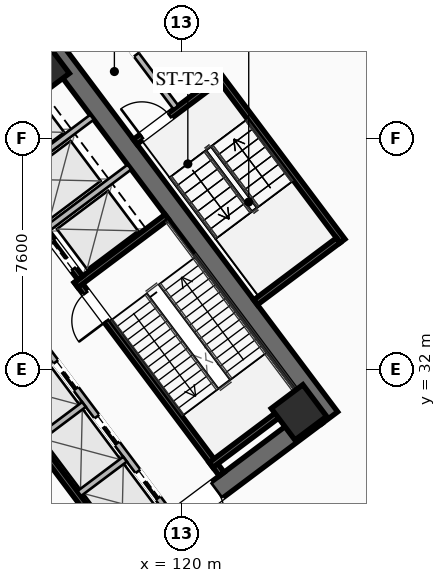
"""IFC4 building model, lengths in metres.
Left out: names, types, materials, properties, quantities, classifications, styles, units other than length and angle.
Written with IfcOpenShell. Run it as: python <this file> out.ifc"""

import sys

from ifc_helpers import new_model, si_unit, direction, frame, frame_2d, origin, origin_2d, place, context, subcontext, project, spatial, rectangle, hollow_rectangle, extrude, element, fill, save


model = new_model("IFC4")
c1 = context("Model", 3, precision=1e-05, world=origin(), true_north=direction((0.0, 1.0)))
c2 = subcontext(c1, "Body", "Model", "MODEL_VIEW")
j1 = project(units=[si_unit("LENGTHUNIT", "METRE"), si_unit("PLANEANGLEUNIT", "RADIAN")], contexts=[c1])
p1 = place(None, origin())
s1 = spatial("IfcSite", under=j1, at=p1, CompositionType="ELEMENT")
p2 = place(p1, origin())
s2 = spatial("IfcBuilding", under=s1, at=p2, CompositionType="ELEMENT")
p3 = place(p2, origin())
s3 = spatial("IfcBuildingStorey", under=s2, at=p3, CompositionType="ELEMENT", Elevation=0.0)
p4 = place(p3, frame((115.524, 42.893, 0.0), z_axis=(0.0, 0.0, 1.0), x_axis=(0.600005007985, -0.799996243986, 0.0)))
e1 = element("IfcWall", 1, at=p4, inside=s3, PredefinedType="SHEAR", context=c2, shape_type="SweptSolid", body=[
    extrude(rectangle(XDim=15.6, YDim=0.65, at=frame_2d((7.8, 0.0))), origin(), (0.0, 0.0, 1.0), 5.4),
])
p5 = place(p3, frame((124.429, 30.478, 0.0), z_axis=(0.0, 0.0, 1.0), x_axis=(-0.799998028465, -0.600002628705, 0.0)))
e2 = element("IfcWall", 2, at=p5, inside=s3, PredefinedType="SHEAR", context=c2, shape_type="SweptSolid", body=[
    extrude(rectangle(XDim=14.86, YDim=0.65, at=frame_2d((7.43, 0.0))), origin(), (0.0, 0.0, 1.0), 5.4),
])
p6 = place(p5, frame((9.13, 0.0, 0.0)))
e3 = element("IfcOpeningElement", 3, at=p6, cuts=e2, PredefinedType="OPENING", context=c2, shape_type="SweptSolid", body=[
    extrude(rectangle(XDim=1.25, YDim=2.25, at=frame_2d((0.625, 1.125))), frame((0.0, 0.335, 0.0), z_axis=(0.0, -1.0, 0.0), x_axis=(1.0, 0.0, 0.0)), (0.0, 0.0, 1.0), 0.67),
])
p7 = place(p5, frame((4.08, 0.0, 0.0)))
e4 = element("IfcOpeningElement", 4, at=p7, cuts=e2, PredefinedType="OPENING", context=c2, shape_type="SweptSolid", body=[
    extrude(rectangle(XDim=1.25, YDim=2.25, at=frame_2d((0.625, 1.125))), frame((0.0, 0.335, 0.0), z_axis=(0.0, -1.0, 0.0), x_axis=(1.0, 0.0, 0.0)), (0.0, 0.0, 1.0), 0.67),
])
for number, where, z_axis, x_axis in (
    (5, (123.87, 30.59, 0.0), (0.0, 0.0, 1.0), (0.8, 0.6, 0.0)),
    (6, (115.41, 41.87, 0.0), (0.0, 0.0, 1.0), (0.8, 0.6, 0.0)),
):
    element("IfcColumn", number, at=place(p3, frame(where, z_axis=z_axis, x_axis=x_axis)), inside=s3, PredefinedType="COLUMN", context=c2, shape_type="SweptSolid", body=[
        extrude(hollow_rectangle(XDim=1.3, YDim=1.3, WallThickness=0.05, at=origin_2d()), origin(), (0.0, 0.0, 1.0), 5.14),
    ])
p8 = place(p3, frame((121.33, 28.56, 0.0), z_axis=(0.0, 0.0, 1.0), x_axis=(-0.600009827119, 0.799992629566, 0.0)))
e7 = element("IfcWall", 7, at=p8, inside=s3, PredefinedType="SHEAR", context=c2, shape_type="SweptSolid", body=[
    extrude(rectangle(XDim=7.95, YDim=0.2, at=frame_2d((3.975, 0.0))), origin(), (0.0, 0.0, 1.0), 5.14),
])
p9 = place(p8, frame((6.3, 0.0, 0.0)))
e8 = element("IfcOpeningElement", 8, at=p9, cuts=e7, PredefinedType="OPENING", context=c2, shape_type="SweptSolid", body=[
    extrude(rectangle(XDim=1.15, YDim=2.2, at=frame_2d((0.575, 1.1))), frame((0.0, 0.11, 0.0), z_axis=(0.0, -1.0, 0.0), x_axis=(1.0, 0.0, 0.0)), (0.0, 0.0, 1.0), 0.22),
])
for number, where, z_axis, x_axis in (
    (9, (116.54, 34.78, 0.0), (0.0, 0.0, 1.0), (0.8, 0.6, 0.0)),
    (10, (120.98, 28.86, 0.0), (0.0, 0.0, 1.0), (0.8, 0.6, 0.0)),
):
    element("IfcWall", number, at=place(p3, frame(where, z_axis=z_axis, x_axis=x_axis)), inside=s3, PredefinedType="SHEAR", context=c2, shape_type="SweptSolid", body=[
        extrude(rectangle(XDim=3.73, YDim=0.2, at=frame_2d((1.865, 0.0))), origin(), (0.0, 0.0, 1.0), 5.14),
    ])
p10 = place(p3, frame((117.938, 26.016, 0.0), z_axis=(0.0, 0.0, 1.0), x_axis=(-0.600005463273, 0.799995902516, 0.0)))
e11 = element("IfcWall", 11, at=p10, inside=s3, PredefinedType="SHEAR", context=c2, shape_type="SweptSolid", body=[
    extrude(rectangle(XDim=14.3, YDim=0.2, at=frame_2d((7.15, 0.0))), origin(), (0.0, 0.0, 1.0), 5.14),
])
p11 = place(p3, frame((112.87, 40.09, 0.0), z_axis=(0.0, 0.0, 1.0), x_axis=(0.599975393228, -0.800018454488, 0.0)))
e12 = element("IfcWall", 12, at=p11, inside=s3, PredefinedType="SHEAR", context=c2, shape_type="SweptSolid", body=[
    extrude(rectangle(XDim=6.35, YDim=0.2, at=frame_2d((3.175, 0.0))), origin(), (0.0, 0.0, 1.0), 5.14),
])
p12 = place(p11, frame((4.875, 0.0, 0.0)))
e13 = element("IfcOpeningElement", 13, at=p12, cuts=e12, PredefinedType="OPENING", context=c2, shape_type="SweptSolid", body=[
    extrude(rectangle(XDim=1.1, YDim=2.2, at=frame_2d((0.55, 1.1))), frame((0.0, 0.11, 0.0), z_axis=(0.0, -1.0, 0.0), x_axis=(1.0, 0.0, 0.0)), (0.0, 0.0, 1.0), 0.22),
])
p13 = place(p11, frame((2.825, 0.0, 0.0)))
e14 = element("IfcOpeningElement", 14, at=p13, cuts=e12, PredefinedType="OPENING", context=c2, shape_type="SweptSolid", body=[
    extrude(rectangle(XDim=1.1, YDim=2.2, at=frame_2d((0.55, 1.1))), frame((0.0, 0.11, 0.0), z_axis=(0.0, -1.0, 0.0), x_axis=(1.0, 0.0, 0.0)), (0.0, 0.0, 1.0), 0.22),
])
p14 = place(p11, frame((0.825, 0.0, 0.0)))
e15 = element("IfcOpeningElement", 15, at=p14, cuts=e12, PredefinedType="OPENING", context=c2, shape_type="SweptSolid", body=[
    extrude(rectangle(XDim=1.1, YDim=2.2, at=frame_2d((0.55, 1.1))), frame((0.0, 0.11, 0.0), z_axis=(0.0, -1.0, 0.0), x_axis=(1.0, 0.0, 0.0)), (0.0, 0.0, 1.0), 0.22),
])
for number, where, z_axis, x_axis in (
    (16, (115.59, 36.63, 0.0), (0.0, 0.0, 1.0), (0.8, 0.6, 0.0)),
    (17, (114.36, 38.27, 0.0), (0.0, 0.0, 1.0), (0.8, 0.6, 0.0)),
):
    element("IfcWall", number, at=place(p3, frame(where, z_axis=z_axis, x_axis=x_axis)), inside=s3, PredefinedType="SOLIDWALL", context=c2, shape_type="SweptSolid", body=[
        extrude(rectangle(XDim=3.38, YDim=0.2, at=frame_2d((1.69, 0.0))), origin(), (0.0, 0.0, 1.0), 5.14),
    ])
p15 = place(p3, frame((119.61, 27.27, 0.0), z_axis=(0.0, 0.0, 1.0), x_axis=(-0.600011488909, 0.79999138319, 0.0)))
e18 = element("IfcWall", 18, at=p15, inside=s3, PredefinedType="SOLIDWALL", context=c2, shape_type="SweptSolid", body=[
    extrude(rectangle(XDim=6.8, YDim=0.2, at=frame_2d((3.4, 0.0))), origin(), (0.0, 0.0, 1.0), 5.14),
])
p16 = place(p15, frame((0.625, 0.0, 0.0)))
e19 = element("IfcOpeningElement", 19, at=p16, cuts=e18, PredefinedType="OPENING", context=c2, shape_type="SweptSolid", body=[
    extrude(rectangle(XDim=1.1, YDim=2.2, at=frame_2d((0.55, 1.1))), frame((0.0, 0.11, 0.0), z_axis=(0.0, -1.0, 0.0), x_axis=(1.0, 0.0, 0.0)), (0.0, 0.0, 1.0), 0.22),
])
p17 = place(p15, frame((2.875, 0.0, 0.0)))
e20 = element("IfcOpeningElement", 20, at=p17, cuts=e18, PredefinedType="OPENING", context=c2, shape_type="SweptSolid", body=[
    extrude(rectangle(XDim=1.1, YDim=2.2, at=frame_2d((0.55, 1.1))), frame((0.0, 0.11, 0.0), z_axis=(0.0, -1.0, 0.0), x_axis=(1.0, 0.0, 0.0)), (0.0, 0.0, 1.0), 0.22),
])
p18 = place(p15, frame((5.125, 0.0, 0.0)))
e21 = element("IfcOpeningElement", 21, at=p18, cuts=e18, PredefinedType="OPENING", context=c2, shape_type="SweptSolid", body=[
    extrude(rectangle(XDim=1.1, YDim=2.2, at=frame_2d((0.55, 1.1))), frame((0.0, 0.11, 0.0), z_axis=(0.0, -1.0, 0.0), x_axis=(1.0, 0.0, 0.0)), (0.0, 0.0, 1.0), 0.22),
])
p19 = place(p3, frame((116.646, 27.922, 0.0), z_axis=(0.0, 0.0, 1.0), x_axis=(0.8, 0.6, 0.0)))
e22 = element("IfcWall", 22, at=p19, inside=s3, PredefinedType="SOLIDWALL", context=c2, shape_type="SweptSolid", body=[
    extrude(rectangle(XDim=1.88, YDim=0.2, at=frame_2d((0.94, 0.0))), origin(), (0.0, 0.0, 1.0), 5.14),
])
p20 = place(p3, frame((115.296, 29.722, 0.0), z_axis=(0.0, 0.0, 1.0), x_axis=(0.799984418148, 0.600020775241, 0.0)))
e23 = element("IfcWall", 23, at=p20, inside=s3, PredefinedType="SOLIDWALL", context=c2, shape_type="SweptSolid", body=[
    extrude(rectangle(XDim=1.88, YDim=0.2, at=frame_2d((0.94, 0.0))), origin(), (0.0, 0.0, 1.0), 5.14),
])
p21 = place(p3, frame((125.304, 36.228, 0.0), z_axis=(0.0, 0.0, 1.0), x_axis=(-0.59998851072, 0.800008616831, 0.0)))
e24 = element("IfcWall", 24, at=p21, inside=s3, PredefinedType="SHEAR", context=c2, shape_type="SweptSolid", body=[
    extrude(rectangle(XDim=6.8, YDim=0.2, at=frame_2d((3.4, 0.0))), origin(), (0.0, 0.0, 1.0), 5.14),
])
p22 = place(p3, frame((118.484, 39.488, 0.0), z_axis=(0.0, 0.0, 1.0), x_axis=(0.800017232136, 0.599977023131, 0.0)))
e25 = element("IfcWall", 25, at=p22, inside=s3, PredefinedType="SHEAR", context=c2, shape_type="SweptSolid", body=[
    extrude(rectangle(XDim=3.4, YDim=0.2, at=frame_2d((1.7, 0.0))), origin(), (0.0, 0.0, 1.0), 5.14),
])
p23 = place(p22, frame((0.275, 0.0, 0.0)))
e26 = element("IfcOpeningElement", 26, at=p23, cuts=e25, PredefinedType="OPENING", context=c2, shape_type="SweptSolid", body=[
    extrude(rectangle(XDim=1.15, YDim=2.2, at=frame_2d((0.575, 1.1))), frame((0.0, 0.11, 0.0), z_axis=(0.0, -1.0, 0.0), x_axis=(1.0, 0.0, 0.0)), (0.0, 0.0, 1.0), 0.22),
])
p24 = place(p3, frame((122.444, 34.208, 0.0), z_axis=(0.0, 0.0, 1.0), x_axis=(0.79999138319, 0.600011488909, 0.0)))
e27 = element("IfcWall", 27, at=p24, inside=s3, PredefinedType="SHEAR", context=c2, shape_type="SweptSolid", body=[
    extrude(rectangle(XDim=3.4, YDim=0.2, at=frame_2d((1.7, 0.0))), origin(), (0.0, 0.0, 1.0), 5.14),
])
p25 = place(p3, frame((117.112, 44.234, 0.0), z_axis=(0.0, 0.0, 1.0), x_axis=(0.59999135767, -0.800006481675, 0.0)))
e28 = element("IfcWall", 28, at=p25, inside=s3, PredefinedType="SOLIDWALL", context=c2, shape_type="SweptSolid", body=[
    extrude(rectangle(XDim=4.52, YDim=0.2, at=frame_2d((2.26, 0.0))), origin(), (0.0, 0.0, 1.0), 3.31),
])
p26 = place(p25, frame((1.2, 0.0, 0.0)))
e29 = element("IfcOpeningElement", 29, at=p26, cuts=e28, PredefinedType="OPENING", context=c2, shape_type="SweptSolid", body=[
    extrude(rectangle(XDim=1.15, YDim=2.2, at=frame_2d((0.575, 1.1))), frame((0.0, 0.11, 0.0), z_axis=(0.0, -1.0, 0.0), x_axis=(1.0, 0.0, 0.0)), (0.0, 0.0, 1.0), 0.22),
])
p27 = place(p7, origin())
e30 = element("IfcDoor", 30, at=p27, inside=s3, OperationType="SINGLE_SWING_RIGHT", PredefinedType="DOOR", context=c2, shape_type="SweptSolid", body=[
    extrude(rectangle(XDim=1.25, YDim=2.25, at=frame_2d((0.625, 1.125))), frame((0.0, 0.025, 0.0), z_axis=(0.0, -1.0, 0.0), x_axis=(1.0, 0.0, 0.0)), (0.0, 0.0, 1.0), 0.05),
])
fill(e4, e30)
p28 = place(p9, origin())
e31 = element("IfcDoor", 31, at=p28, inside=s3, OperationType="SINGLE_SWING_LEFT", PredefinedType="DOOR", context=c2, shape_type="SweptSolid", body=[
    extrude(rectangle(XDim=1.15, YDim=2.2, at=frame_2d((0.575, 1.1))), frame((0.0, 0.025, 0.0), z_axis=(0.0, -1.0, 0.0), x_axis=(1.0, 0.0, 0.0)), (0.0, 0.0, 1.0), 0.05),
])
fill(e8, e31)
p29 = place(p23, origin())
e32 = element("IfcDoor", 32, at=p29, inside=s3, OperationType="SINGLE_SWING_LEFT", PredefinedType="DOOR", context=c2, shape_type="SweptSolid", body=[
    extrude(rectangle(XDim=1.15, YDim=2.2, at=frame_2d((0.575, 1.1))), frame((0.0, 0.025, 0.0), z_axis=(0.0, -1.0, 0.0), x_axis=(1.0, 0.0, 0.0)), (0.0, 0.0, 1.0), 0.05),
])
fill(e26, e32)
p30 = place(p26, origin())
e33 = element("IfcDoor", 33, at=p30, inside=s3, OperationType="SINGLE_SWING_LEFT", PredefinedType="DOOR", context=c2, shape_type="SweptSolid", body=[
    extrude(rectangle(XDim=1.15, YDim=2.2, at=frame_2d((0.575, 1.1))), frame((0.0, 0.025, 0.0), z_axis=(0.0, -1.0, 0.0), x_axis=(1.0, 0.0, 0.0)), (0.0, 0.0, 1.0), 0.05),
])
fill(e29, e33)
p31 = place(p16, origin())
e34 = element("IfcDoor", 34, at=p31, inside=s3, OperationType="SLIDING_TO_LEFT", PredefinedType="DOOR", context=c2, shape_type="SweptSolid", body=[
    extrude(rectangle(XDim=1.1, YDim=2.2, at=frame_2d((0.55, 1.1))), frame((0.0, 0.025, 0.0), z_axis=(0.0, -1.0, 0.0), x_axis=(1.0, 0.0, 0.0)), (0.0, 0.0, 1.0), 0.05),
])
fill(e19, e34)
p32 = place(p17, origin())
e35 = element("IfcDoor", 35, at=p32, inside=s3, OperationType="SLIDING_TO_LEFT", PredefinedType="DOOR", context=c2, shape_type="SweptSolid", body=[
    extrude(rectangle(XDim=1.1, YDim=2.2, at=frame_2d((0.55, 1.1))), frame((0.0, 0.025, 0.0), z_axis=(0.0, -1.0, 0.0), x_axis=(1.0, 0.0, 0.0)), (0.0, 0.0, 1.0), 0.05),
])
fill(e20, e35)
p33 = place(p18, origin())
e36 = element("IfcDoor", 36, at=p33, inside=s3, OperationType="SLIDING_TO_LEFT", PredefinedType="DOOR", context=c2, shape_type="SweptSolid", body=[
    extrude(rectangle(XDim=1.1, YDim=2.2, at=frame_2d((0.55, 1.1))), frame((0.0, 0.025, 0.0), z_axis=(0.0, -1.0, 0.0), x_axis=(1.0, 0.0, 0.0)), (0.0, 0.0, 1.0), 0.05),
])
fill(e21, e36)
p34 = place(p12, origin())
e37 = element("IfcDoor", 37, at=p34, inside=s3, OperationType="SLIDING_TO_LEFT", PredefinedType="DOOR", context=c2, shape_type="SweptSolid", body=[
    extrude(rectangle(XDim=1.1, YDim=2.2, at=frame_2d((0.55, 1.1))), frame((0.0, 0.025, 0.0), z_axis=(0.0, -1.0, 0.0), x_axis=(1.0, 0.0, 0.0)), (0.0, 0.0, 1.0), 0.05),
])
fill(e13, e37)
save(model, sys.argv[1])
